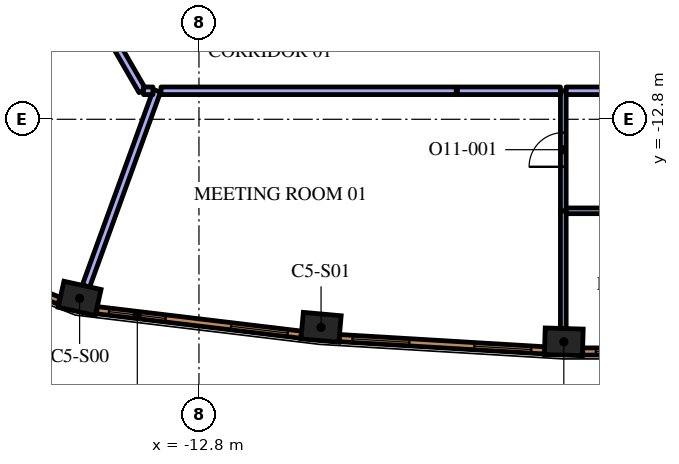
"""IFC4 building model, lengths in metres.
Left out: names, types, materials, properties, quantities, classifications, styles, units other than length and angle.
Written with IfcOpenShell. Run it as: python <this file> out.ifc"""

import sys

from ifc_helpers import new_model, si_unit, direction, frame, frame_2d, origin, origin_2d, place, context, subcontext, project, spatial, rectangle, extrude, element, fill, save


model = new_model("IFC4")
c1 = context("Model", 3, precision=1e-05, world=origin(), true_north=direction((0.0, 1.0)))
c2 = subcontext(c1, "Body", "Model", "MODEL_VIEW")
j1 = project(units=[si_unit("LENGTHUNIT", "METRE"), si_unit("PLANEANGLEUNIT", "RADIAN")], contexts=[c1])
p1 = place(None, origin())
s1 = spatial("IfcSite", under=j1, at=p1, CompositionType="ELEMENT")
p2 = place(p1, origin())
s2 = spatial("IfcBuilding", under=s1, at=p2, CompositionType="ELEMENT")
p3 = place(p2, frame((0.0, 0.0, 275.4)))
s3 = spatial("IfcBuildingStorey", under=s2, at=p3, CompositionType="ELEMENT", Elevation=275.4)
for number, where, z_axis, x_axis in (
    (1, (-15.941, -17.512, 0.0), (0.0, 0.0, 1.0), (0.976, -0.217, 0.0)),
    (2, (-9.587, -18.274, 0.0), (0.0, 0.0, 1.0), (0.996, -0.089, 0.0)),
    (3, (-3.199, -18.655, 0.0), (0.0, 0.0, 1.0), (1.0, -0.03, 0.0)),
):
    element("IfcColumn", number, at=place(p3, frame(where, z_axis=z_axis, x_axis=x_axis)), inside=s3, PredefinedType="COLUMN", context=c2, shape_type="SweptSolid", body=[
        extrude(rectangle(XDim=1.0, YDim=0.7, at=origin_2d()), origin(), (0.0, 0.0, 1.0), 4.2),
    ])
p4 = place(p3, frame((-3.213, -15.204, 0.0), z_axis=(0.0, 0.0, 1.0), x_axis=(0.0, -1.0, 0.0)))
e4 = element("IfcWall", 4, at=p4, inside=s3, PredefinedType="PARTITIONING", context=c2, shape_type="SweptSolid", body=[
    extrude(rectangle(XDim=3.1, YDim=0.15, at=frame_2d((1.55, 0.0))), origin(), (0.0, 0.0, 1.0), 3.55),
])
p5 = place(p3, frame((-3.213, -15.212, 0.0), z_axis=(0.0, 0.0, 1.0), x_axis=(0.0, 1.0, 0.0)))
e5 = element("IfcWall", 5, at=p5, inside=s3, PredefinedType="PARTITIONING", context=c2, shape_type="SweptSolid", body=[
    extrude(rectangle(XDim=3.162, YDim=0.15, at=frame_2d((1.581, 0.0))), origin(), (0.0, 0.0, 1.0), 3.55),
])
p6 = place(p5, frame((1.162, 0.0, 0.0)))
e6 = element("IfcOpeningElement", 6, at=p6, cuts=e5, PredefinedType="OPENING", context=c2, shape_type="SweptSolid", body=[
    extrude(rectangle(XDim=0.9, YDim=2.1, at=frame_2d((0.45, 1.05))), frame((0.0, 0.085, 0.0), z_axis=(0.0, -1.0, 0.0), x_axis=(1.0, 0.0, 0.0)), (0.0, 0.0, 1.0), 0.17),
])
p7 = place(p3, frame((-15.774, -17.19, 0.0), z_axis=(0.0, 0.0, 1.0), x_axis=(0.341821907823, 0.93976474893, 0.0)))
e7 = element("IfcWall", 7, at=p7, inside=s3, PredefinedType="PARTITIONING", context=c2, shape_type="SweptSolid", body=[
    extrude(rectangle(XDim=5.469, YDim=0.2, at=frame_2d((2.735, 0.0))), origin(), (0.0, 0.0, 1.0), 3.55),
])
p8 = place(p3, frame((-6.0, -12.05, 0.0), z_axis=(0.0, 0.0, 1.0), x_axis=(1.0, 0.0, 0.0)))
e8 = element("IfcWall", 8, at=p8, inside=s3, PredefinedType="PARTITIONING", context=c2, shape_type="SweptSolid", body=[
    extrude(rectangle(XDim=2.712, YDim=0.2, at=frame_2d((1.356, 0.0))), origin(), (0.0, 0.0, 1.0), 3.55),
])
p9 = place(p3, frame((-13.799, -12.05, 0.0), z_axis=(0.0, 0.0, 1.0), x_axis=(1.0, 0.0, 0.0)))
e9 = element("IfcWall", 9, at=p9, inside=s3, PredefinedType="PARTITIONING", context=c2, shape_type="SweptSolid", body=[
    extrude(rectangle(XDim=7.769, YDim=0.2, at=frame_2d((3.884, 0.0))), origin(), (0.0, 0.0, 1.0), 3.55),
])
p10 = place(p3, frame((3.138, -15.208, 0.0), z_axis=(0.0, 0.0, 1.0), x_axis=(-1.0, 0.0, 0.0)))
e10 = element("IfcWall", 10, at=p10, inside=s3, PredefinedType="PARTITIONING", context=c2, shape_type="SweptSolid", body=[
    extrude(rectangle(XDim=6.276, YDim=0.15, at=frame_2d((3.138, 0.0))), origin(), (0.0, 0.0, 1.0), 3.55),
])
p11 = place(p10, frame((2.676, 0.0, 0.0)))
e11 = element("IfcOpeningElement", 11, at=p11, cuts=e10, PredefinedType="OPENING", context=c2, shape_type="SweptSolid", body=[
    extrude(rectangle(XDim=0.9, YDim=2.1, at=frame_2d((0.45, 1.05))), frame((0.0, 0.085, 0.0), z_axis=(0.0, -1.0, 0.0), x_axis=(1.0, 0.0, 0.0)), (0.0, 0.0, 1.0), 0.17),
])
p12 = place(p3, frame((-3.138, -12.05, 0.0), z_axis=(0.0, 0.0, 1.0), x_axis=(1.0, 0.0, 0.0)))
e12 = element("IfcWall", 12, at=p12, inside=s3, PredefinedType="PARTITIONING", context=c2, shape_type="SweptSolid", body=[
    extrude(rectangle(XDim=9.138, YDim=0.2, at=frame_2d((4.569, 0.0))), origin(), (0.0, 0.0, 1.0), 3.55),
])
p13 = place(p3, frame((-17.218, -6.978, 0.0), z_axis=(0.0, 0.0, 1.0), x_axis=(0.500012299885, -0.866018302326, 0.0)))
e13 = element("IfcWall", 13, at=p13, inside=s3, PredefinedType="PARTITIONING", context=c2, shape_type="SweptSolid", body=[
    extrude(rectangle(XDim=5.857, YDim=0.2, at=frame_2d((2.929, 0.0))), origin(), (0.0, 0.0, 1.0), 3.55),
])
p14 = place(p3, frame((-14.26, -12.05, 0.0), z_axis=(0.0, 0.0, 1.0), x_axis=(1.0, 0.0, 0.0)))
e14 = element("IfcWall", 14, at=p14, inside=s3, PredefinedType="PARTITIONING", context=c2, shape_type="SweptSolid", body=[
    extrude(rectangle(XDim=0.248, YDim=0.2, at=frame_2d((0.124, 0.0))), origin(), (0.0, 0.0, 1.0), 3.55),
])
p15 = place(p3, frame((-15.487, -17.823, 0.0), z_axis=(0.0, 0.0, 1.0), x_axis=(0.992885582795, -0.119072328769, 0.0)))
e15 = element("IfcWall", 15, at=p15, inside=s3, PredefinedType="SOLIDWALL", context=c2, shape_type="SweptSolid", body=[
    extrude(rectangle(XDim=5.415, YDim=0.19, at=frame_2d((2.708, 0.0))), origin(), (0.0, 0.0, 1.0), 3.95),
])
p16 = place(p15, frame((0.323, 0.0, 0.6)))
e16 = element("IfcOpeningElement", 16, at=p16, cuts=e15, PredefinedType="OPENING", context=c2, shape_type="SweptSolid", body=[
    extrude(rectangle(XDim=1.5, YDim=2.85, at=frame_2d((0.75, 1.425))), frame((0.0, 0.105, 0.0), z_axis=(0.0, -1.0, 0.0), x_axis=(1.0, 0.0, 0.0)), (0.0, 0.0, 1.0), 0.21),
])
p17 = place(p15, frame((3.558, 0.0, 0.6)))
e17 = element("IfcOpeningElement", 17, at=p17, cuts=e15, PredefinedType="OPENING", context=c2, shape_type="SweptSolid", body=[
    extrude(rectangle(XDim=1.5, YDim=2.85, at=frame_2d((0.75, 1.425))), frame((0.0, 0.105, 0.0), z_axis=(0.0, -1.0, 0.0), x_axis=(1.0, 0.0, 0.0)), (0.0, 0.0, 1.0), 0.21),
])
p18 = place(p3, frame((-9.107, -18.558, 0.0), z_axis=(0.0, 0.0, 1.0), x_axis=(0.998221492823, -0.059614186786, 0.0)))
e18 = element("IfcWall", 18, at=p18, inside=s3, PredefinedType="SOLIDWALL", context=c2, shape_type="SweptSolid", body=[
    extrude(rectangle(XDim=5.406, YDim=0.19, at=frame_2d((2.703, 0.0))), origin(), (0.0, 0.0, 1.0), 3.95),
])
p19 = place(p18, frame((0.346, 0.0, 0.6)))
e19 = element("IfcOpeningElement", 19, at=p19, cuts=e18, PredefinedType="OPENING", context=c2, shape_type="SweptSolid", body=[
    extrude(rectangle(XDim=1.5, YDim=2.85, at=frame_2d((0.75, 1.425))), frame((0.0, 0.105, 0.0), z_axis=(0.0, -1.0, 0.0), x_axis=(1.0, 0.0, 0.0)), (0.0, 0.0, 1.0), 0.21),
])
p20 = place(p18, frame((3.559, 0.0, 0.6)))
e20 = element("IfcOpeningElement", 20, at=p20, cuts=e18, PredefinedType="OPENING", context=c2, shape_type="SweptSolid", body=[
    extrude(rectangle(XDim=1.5, YDim=2.85, at=frame_2d((0.75, 1.425))), frame((0.0, 0.105, 0.0), z_axis=(0.0, -1.0, 0.0), x_axis=(1.0, 0.0, 0.0)), (0.0, 0.0, 1.0), 0.21),
])
p21 = place(p3, frame((-2.703, -18.91, 0.0), z_axis=(0.0, 0.0, 1.0), x_axis=(1.0, 0.0, 0.0)))
e21 = element("IfcWall", 21, at=p21, inside=s3, PredefinedType="SOLIDWALL", context=c2, shape_type="SweptSolid", body=[
    extrude(rectangle(XDim=5.406, YDim=0.19, at=frame_2d((2.703, 0.0))), origin(), (0.0, 0.0, 1.0), 3.95),
])
p22 = place(p21, frame((0.346, 0.0, 0.6)))
e22 = element("IfcOpeningElement", 22, at=p22, cuts=e21, PredefinedType="OPENING", context=c2, shape_type="SweptSolid", body=[
    extrude(rectangle(XDim=1.5, YDim=2.85, at=frame_2d((0.75, 1.425))), frame((0.0, 0.105, 0.0), z_axis=(0.0, -1.0, 0.0), x_axis=(1.0, 0.0, 0.0)), (0.0, 0.0, 1.0), 0.21),
])
p23 = place(p21, frame((3.56, 0.0, 0.6)))
e23 = element("IfcOpeningElement", 23, at=p23, cuts=e21, PredefinedType="OPENING", context=c2, shape_type="SweptSolid", body=[
    extrude(rectangle(XDim=1.5, YDim=2.85, at=frame_2d((0.75, 1.425))), frame((0.0, 0.105, 0.0), z_axis=(0.0, -1.0, 0.0), x_axis=(1.0, 0.0, 0.0)), (0.0, 0.0, 1.0), 0.21),
])
p24 = place(p3, frame((-19.496, -16.392, 0.0), z_axis=(0.0, 0.0, 1.0), x_axis=(0.93100888477, -0.364996515709, 0.0)))
e24 = element("IfcWall", 24, at=p24, inside=s3, PredefinedType="SOLIDWALL", context=c2, shape_type="SweptSolid", body=[
    extrude(rectangle(XDim=3.237, YDim=0.19, at=frame_2d((1.618, 0.0))), origin(), (0.0, 0.0, 1.0), 3.95),
])
p25 = place(p24, frame((1.068, 0.0, 0.6)))
e25 = element("IfcOpeningElement", 25, at=p25, cuts=e24, PredefinedType="OPENING", context=c2, shape_type="SweptSolid", body=[
    extrude(rectangle(XDim=1.1, YDim=2.85, at=frame_2d((0.55, 1.425))), frame((0.0, 0.105, 0.0), z_axis=(0.0, -1.0, 0.0), x_axis=(1.0, 0.0, 0.0)), (0.0, 0.0, 1.0), 0.21),
])
p26 = place(p6, origin())
e26 = element("IfcDoor", 26, at=p26, inside=s3, OperationType="SINGLE_SWING_RIGHT", PredefinedType="DOOR", context=c2, shape_type="SweptSolid", body=[
    extrude(rectangle(XDim=0.9, YDim=2.1, at=frame_2d((0.45, 1.05))), frame((0.0, 0.025, 0.0), z_axis=(0.0, -1.0, 0.0), x_axis=(1.0, 0.0, 0.0)), (0.0, 0.0, 1.0), 0.05),
])
fill(e6, e26)
p27 = place(p16, origin())
e27 = element("IfcWindow", 27, at=p27, inside=s3, PartitioningType="SINGLE_PANEL", PredefinedType="WINDOW", context=c2, shape_type="SweptSolid", body=[
    extrude(rectangle(XDim=1.5, YDim=2.85, at=frame_2d((0.75, 1.425))), frame((0.0, 0.045, 0.0), z_axis=(0.0, -1.0, 0.0), x_axis=(1.0, 0.0, 0.0)), (0.0, 0.0, 1.0), 0.06),
])
fill(e16, e27)
p28 = place(p17, origin())
e28 = element("IfcWindow", 28, at=p28, inside=s3, PartitioningType="SINGLE_PANEL", PredefinedType="WINDOW", context=c2, shape_type="SweptSolid", body=[
    extrude(rectangle(XDim=1.5, YDim=2.85, at=frame_2d((0.75, 1.425))), frame((0.0, 0.045, 0.0), z_axis=(0.0, -1.0, 0.0), x_axis=(1.0, 0.0, 0.0)), (0.0, 0.0, 1.0), 0.06),
])
fill(e17, e28)
p29 = place(p19, origin())
e29 = element("IfcWindow", 29, at=p29, inside=s3, PartitioningType="SINGLE_PANEL", PredefinedType="WINDOW", context=c2, shape_type="SweptSolid", body=[
    extrude(rectangle(XDim=1.5, YDim=2.85, at=frame_2d((0.75, 1.425))), frame((0.0, 0.045, 0.0), z_axis=(0.0, -1.0, 0.0), x_axis=(1.0, 0.0, 0.0)), (0.0, 0.0, 1.0), 0.06),
])
fill(e19, e29)
p30 = place(p20, origin())
e30 = element("IfcWindow", 30, at=p30, inside=s3, PartitioningType="SINGLE_PANEL", PredefinedType="WINDOW", context=c2, shape_type="SweptSolid", body=[
    extrude(rectangle(XDim=1.5, YDim=2.85, at=frame_2d((0.75, 1.425))), frame((0.0, 0.045, 0.0), z_axis=(0.0, -1.0, 0.0), x_axis=(1.0, 0.0, 0.0)), (0.0, 0.0, 1.0), 0.06),
])
fill(e20, e30)
p31 = place(p22, origin())
e31 = element("IfcWindow", 31, at=p31, inside=s3, PartitioningType="SINGLE_PANEL", PredefinedType="WINDOW", context=c2, shape_type="SweptSolid", body=[
    extrude(rectangle(XDim=1.5, YDim=2.85, at=frame_2d((0.75, 1.425))), frame((0.0, 0.045, 0.0), z_axis=(0.0, -1.0, 0.0), x_axis=(1.0, 0.0, 0.0)), (0.0, 0.0, 1.0), 0.06),
])
fill(e22, e31)
save(model, sys.argv[1])
